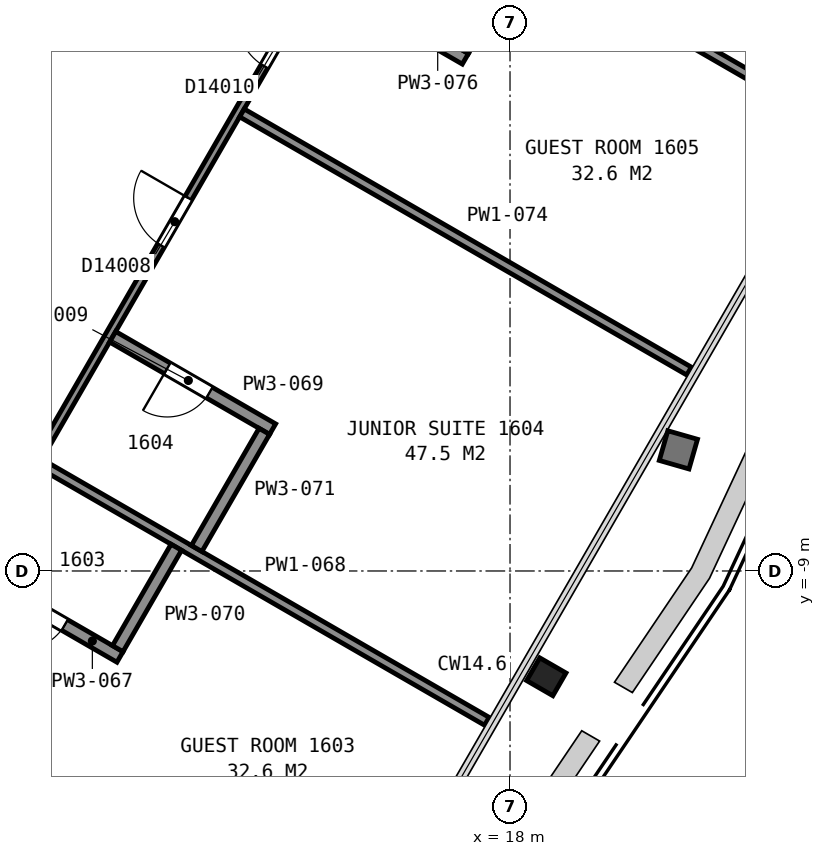
"""IFC4 building model, lengths in metres.
Left out: names, types, materials, properties, quantities, classifications, styles, units other than length and angle.
Written with IfcOpenShell. Run it as: python <this file> out.ifc"""

import sys

from ifc_helpers import new_model, si_unit, direction, frame, frame_2d, origin, origin_2d, place, context, subcontext, project, spatial, rectangle, i_section, extrude, element, fill, save


model = new_model("IFC4")
c1 = context("Model", 3, precision=1e-05, world=origin(), true_north=direction((0.0, 1.0)))
c2 = subcontext(c1, "Body", "Model", "MODEL_VIEW")
j1 = project(units=[si_unit("LENGTHUNIT", "METRE"), si_unit("PLANEANGLEUNIT", "RADIAN")], contexts=[c1])
p1 = place(None, origin())
s1 = spatial("IfcSite", under=j1, at=p1, CompositionType="ELEMENT")
p2 = place(p1, origin())
s2 = spatial("IfcBuilding", under=s1, at=p2, CompositionType="ELEMENT")
p3 = place(p2, frame((0.0, 0.0, 72.8)))
s3 = spatial("IfcBuildingStorey", under=s2, at=p3, CompositionType="ELEMENT", Elevation=72.8)
p4 = place(p3, frame((18.512, -10.691, 0.025), z_axis=(0.07202792121, -0.041599379805, 0.996534731038), x_axis=(-0.500403695, -0.865792204467, 2.6711735e-05)))
e1 = element("IfcColumn", 1, at=p4, inside=s3, PredefinedType="COLUMN", context=c2, shape_type="SweptSolid", body=[
    extrude(i_section(OverallWidth=0.432, OverallDepth=0.498, WebThickness=0.056, FlangeThickness=0.089, FilletRadius=0.015, at=origin_2d()), origin(), (0.0, 0.0, 1.0), 3.562),
])
p5 = place(p3, frame((8.492, -3.012, 0.0), z_axis=(0.0, 0.0, 1.0), x_axis=(0.499972957231, 0.866041016371, 0.0)))
e2 = element("IfcWall", 2, at=p5, inside=s3, PredefinedType="PARTITIONING", context=c2, shape_type="SweptSolid", body=[
    extrude(rectangle(XDim=10.349, YDim=0.2, at=frame_2d((5.174, 0.0))), origin(), (0.0, 0.0, 1.0), 3.35),
])
p6 = place(p3, frame((18.179, 6.606, 0.0), z_axis=(0.0, 0.0, 1.0), x_axis=(-0.500003973642, -0.866023109589, 0.0)))
e3 = element("IfcWall", 3, at=p6, inside=s3, PredefinedType="PARTITIONING", context=c2, shape_type="SweptSolid", body=[
    extrude(rectangle(XDim=28.826, YDim=0.125, at=frame_2d((14.413, 0.0))), origin(), (0.0, 0.0, 1.0), 2.613),
])
p7 = place(p6, frame((21.501, 0.0, 0.0)))
e4 = element("IfcOpeningElement", 4, at=p7, cuts=e3, PredefinedType="OPENING", context=c2, shape_type="SweptSolid", body=[
    extrude(rectangle(XDim=0.9, YDim=2.1, at=frame_2d((0.45, 1.05))), frame((0.0, 0.073, 0.0), z_axis=(0.0, -1.0, 0.0), x_axis=(1.0, 0.0, 0.0)), (0.0, 0.0, 1.0), 0.145),
])
p8 = place(p6, frame((18.894, 0.0, 0.0)))
e5 = element("IfcOpeningElement", 5, at=p8, cuts=e3, PredefinedType="OPENING", context=c2, shape_type="SweptSolid", body=[
    extrude(rectangle(XDim=0.9, YDim=2.1, at=frame_2d((0.45, 1.05))), frame((0.0, 0.073, 0.0), z_axis=(0.0, -1.0, 0.0), x_axis=(1.0, 0.0, 0.0)), (0.0, 0.0, 1.0), 0.145),
])
p9 = place(p6, frame((10.937, 0.0, 0.0)))
e6 = element("IfcOpeningElement", 6, at=p9, cuts=e3, PredefinedType="OPENING", context=c2, shape_type="SweptSolid", body=[
    extrude(rectangle(XDim=0.9, YDim=2.1, at=frame_2d((0.45, 1.05))), frame((0.0, 0.073, 0.0), z_axis=(0.0, -1.0, 0.0), x_axis=(1.0, 0.0, 0.0)), (0.0, 0.0, 1.0), 0.145),
])
p10 = place(p6, frame((7.535, 0.0, 0.0)))
e7 = element("IfcOpeningElement", 7, at=p10, cuts=e3, PredefinedType="OPENING", context=c2, shape_type="SweptSolid", body=[
    extrude(rectangle(XDim=0.9, YDim=2.1, at=frame_2d((0.45, 1.05))), frame((0.0, 0.073, 0.0), z_axis=(0.0, -1.0, 0.0), x_axis=(1.0, 0.0, 0.0)), (0.0, 0.0, 1.0), 0.145),
])
p11 = place(p6, frame((0.827, 0.0, 0.0)))
e8 = element("IfcOpeningElement", 8, at=p11, cuts=e3, PredefinedType="OPENING", context=c2, shape_type="SweptSolid", body=[
    extrude(rectangle(XDim=0.9, YDim=2.1, at=frame_2d((0.45, 1.05))), frame((0.0, 0.073, 0.0), z_axis=(0.0, -1.0, 0.0), x_axis=(1.0, 0.0, 0.0)), (0.0, 0.0, 1.0), 0.145),
])
p12 = place(p3, frame((7.911, -11.303, 0.0), z_axis=(0.0, 0.0, 1.0), x_axis=(0.866012267213, -0.500022752519, 0.0)))
e9 = element("IfcWall", 9, at=p12, inside=s3, PredefinedType="PARTITIONING", context=c2, shape_type="SweptSolid", body=[
    extrude(rectangle(XDim=8.492, YDim=0.15, at=frame_2d((4.246, 0.0))), origin(), (0.0, 0.0, 1.0), 2.613),
])
p13 = place(p3, frame((9.215, -9.045, 0.0), z_axis=(0.0, 0.0, 1.0), x_axis=(0.865989529477, -0.500062130976, 0.0)))
e10 = element("IfcWall", 10, at=p13, inside=s3, PredefinedType="PARTITIONING", context=c2, shape_type="SweptSolid", body=[
    extrude(rectangle(XDim=2.738, YDim=0.2, at=frame_2d((1.369, 0.0))), origin(), (0.0, 0.0, 1.0), 2.613),
])
p14 = place(p13, frame((0.887, 0.0, 0.0)))
e11 = element("IfcOpeningElement", 11, at=p14, cuts=e10, PredefinedType="OPENING", context=c2, shape_type="SweptSolid", body=[
    extrude(rectangle(XDim=0.8, YDim=2.1, at=frame_2d((0.4, 1.05))), frame((0.0, 0.11, 0.0), z_axis=(0.0, -1.0, 0.0), x_axis=(1.0, 0.0, 0.0)), (0.0, 0.0, 1.0), 0.22),
])
p15 = place(p3, frame((10.265, -7.226, 0.0), z_axis=(0.0, 0.0, 1.0), x_axis=(0.866024716685, -0.500001190089, 0.0)))
e12 = element("IfcWall", 12, at=p15, inside=s3, PredefinedType="PARTITIONING", context=c2, shape_type="SweptSolid", body=[
    extrude(rectangle(XDim=8.492, YDim=0.15, at=frame_2d((4.246, 0.0))), origin(), (0.0, 0.0, 1.0), 2.613),
])
p16 = place(p3, frame((14.096, -6.667, 0.0), z_axis=(0.0, 0.0, 1.0), x_axis=(-0.866023634079, 0.500003065207, 0.0)))
e13 = element("IfcWall", 13, at=p16, inside=s3, PredefinedType="PARTITIONING", context=c2, shape_type="SweptSolid", body=[
    extrude(rectangle(XDim=3.038, YDim=0.2, at=frame_2d((1.519, 0.0))), origin(), (0.0, 0.0, 1.0), 2.613),
])
p17 = place(p16, frame((1.2, 0.0, 0.0)))
e14 = element("IfcOpeningElement", 14, at=p17, cuts=e13, PredefinedType="OPENING", context=c2, shape_type="SweptSolid", body=[
    extrude(rectangle(XDim=0.8, YDim=2.1, at=frame_2d((0.4, 1.05))), frame((0.0, 0.11, 0.0), z_axis=(0.0, -1.0, 0.0), x_axis=(1.0, 0.0, 0.0)), (0.0, 0.0, 1.0), 0.22),
])
p18 = place(p3, frame((11.549, -10.277, 0.0), z_axis=(0.0, 0.0, 1.0), x_axis=(0.499876134923, 0.86609690551, 0.0)))
e15 = element("IfcWall", 15, at=p18, inside=s3, PredefinedType="PARTITIONING", context=c2, shape_type="SweptSolid", body=[
    extrude(rectangle(XDim=1.925, YDim=0.2, at=frame_2d((0.963, 0.0))), origin(), (0.0, 0.0, 1.0), 2.613),
])
p19 = place(p3, frame((12.846, -8.63, 0.0), z_axis=(0.0, 0.0, 1.0), x_axis=(0.500092923031, 0.865971748, 0.0)))
e16 = element("IfcWall", 16, at=p19, inside=s3, PredefinedType="PARTITIONING", context=c2, shape_type="SweptSolid", body=[
    extrude(rectangle(XDim=2.225, YDim=0.2, at=frame_2d((1.112, 0.0))), origin(), (0.0, 0.0, 1.0), 2.613),
])
p20 = place(p3, frame((13.591, -1.466, 0.0), z_axis=(0.0, 0.0, 1.0), x_axis=(0.866022790583, -0.50000452617, 0.0)))
e17 = element("IfcWall", 17, at=p20, inside=s3, PredefinedType="PARTITIONING", context=c2, shape_type="SweptSolid", body=[
    extrude(rectangle(XDim=8.491, YDim=0.15, at=frame_2d((4.246, 0.0))), origin(), (0.0, 0.0, 1.0), 2.613),
])
p21 = place(p3, frame((14.898, 0.789, 0.0), z_axis=(0.0, 0.0, 1.0), x_axis=(0.866102295869, -0.499866795347, 0.0)))
e18 = element("IfcWall", 18, at=p21, inside=s3, PredefinedType="PARTITIONING", context=c2, shape_type="SweptSolid", body=[
    extrude(rectangle(XDim=2.733, YDim=0.2, at=frame_2d((1.367, 0.0))), origin(), (0.0, 0.0, 1.0), 2.613),
])
p22 = place(p21, frame((0.883, 0.0, 0.0)))
e19 = element("IfcOpeningElement", 19, at=p22, cuts=e18, PredefinedType="OPENING", context=c2, shape_type="SweptSolid", body=[
    extrude(rectangle(XDim=0.8, YDim=2.1, at=frame_2d((0.4, 1.05))), frame((0.0, 0.11, 0.0), z_axis=(0.0, -1.0, 0.0), x_axis=(1.0, 0.0, 0.0)), (0.0, 0.0, 1.0), 0.22),
])
p23 = place(p3, frame((15.948, 2.608, 0.0), z_axis=(0.0, 0.0, 1.0), x_axis=(0.866059124033, -0.499941590267, 0.0)))
e20 = element("IfcWall", 20, at=p23, inside=s3, PredefinedType="PARTITIONING", context=c2, shape_type="SweptSolid", body=[
    extrude(rectangle(XDim=8.487, YDim=0.15, at=frame_2d((4.243, 0.0))), origin(), (0.0, 0.0, 1.0), 2.613),
])
p24 = place(p3, frame((17.229, -0.44, 0.0), z_axis=(0.0, 0.0, 1.0), x_axis=(0.499667418833, 0.866217334482, 0.0)))
e21 = element("IfcWall", 21, at=p24, inside=s3, PredefinedType="PARTITIONING", context=c2, shape_type="SweptSolid", body=[
    extrude(rectangle(XDim=1.92, YDim=0.2, at=frame_2d((0.96, 0.0))), origin(), (0.0, 0.0, 1.0), 2.613),
])
p25 = place(p9, origin())
e22 = element("IfcDoor", 22, at=p25, inside=s3, OperationType="SINGLE_SWING_LEFT", PredefinedType="DOOR", context=c2, shape_type="SweptSolid", body=[
    extrude(rectangle(XDim=0.9, YDim=2.1, at=frame_2d((0.45, 1.05))), frame((0.0, 0.025, 0.0), z_axis=(0.0, -1.0, 0.0), x_axis=(1.0, 0.0, 0.0)), (0.0, 0.0, 1.0), 0.05),
])
fill(e6, e22)
p26 = place(p10, origin())
e23 = element("IfcDoor", 23, at=p26, inside=s3, OperationType="SINGLE_SWING_LEFT", PredefinedType="DOOR", context=c2, shape_type="SweptSolid", body=[
    extrude(rectangle(XDim=0.9, YDim=2.1, at=frame_2d((0.45, 1.05))), frame((0.0, 0.025, 0.0), z_axis=(0.0, -1.0, 0.0), x_axis=(1.0, 0.0, 0.0)), (0.0, 0.0, 1.0), 0.05),
])
fill(e7, e23)
p27 = place(p14, origin())
e24 = element("IfcDoor", 24, at=p27, inside=s3, OperationType="SINGLE_SWING_LEFT", PredefinedType="DOOR", context=c2, shape_type="SweptSolid", body=[
    extrude(rectangle(XDim=0.8, YDim=2.1, at=frame_2d((0.4, 1.05))), frame((0.0, 0.025, 0.0), z_axis=(0.0, -1.0, 0.0), x_axis=(1.0, 0.0, 0.0)), (0.0, 0.0, 1.0), 0.05),
])
fill(e11, e24)
p28 = place(p17, origin())
e25 = element("IfcDoor", 25, at=p28, inside=s3, OperationType="SINGLE_SWING_RIGHT", PredefinedType="DOOR", context=c2, shape_type="SweptSolid", body=[
    extrude(rectangle(XDim=0.8, YDim=2.1, at=frame_2d((0.4, 1.05))), frame((0.0, 0.025, 0.0), z_axis=(0.0, -1.0, 0.0), x_axis=(1.0, 0.0, 0.0)), (0.0, 0.0, 1.0), 0.05),
])
fill(e14, e25)
save(model, sys.argv[1])
